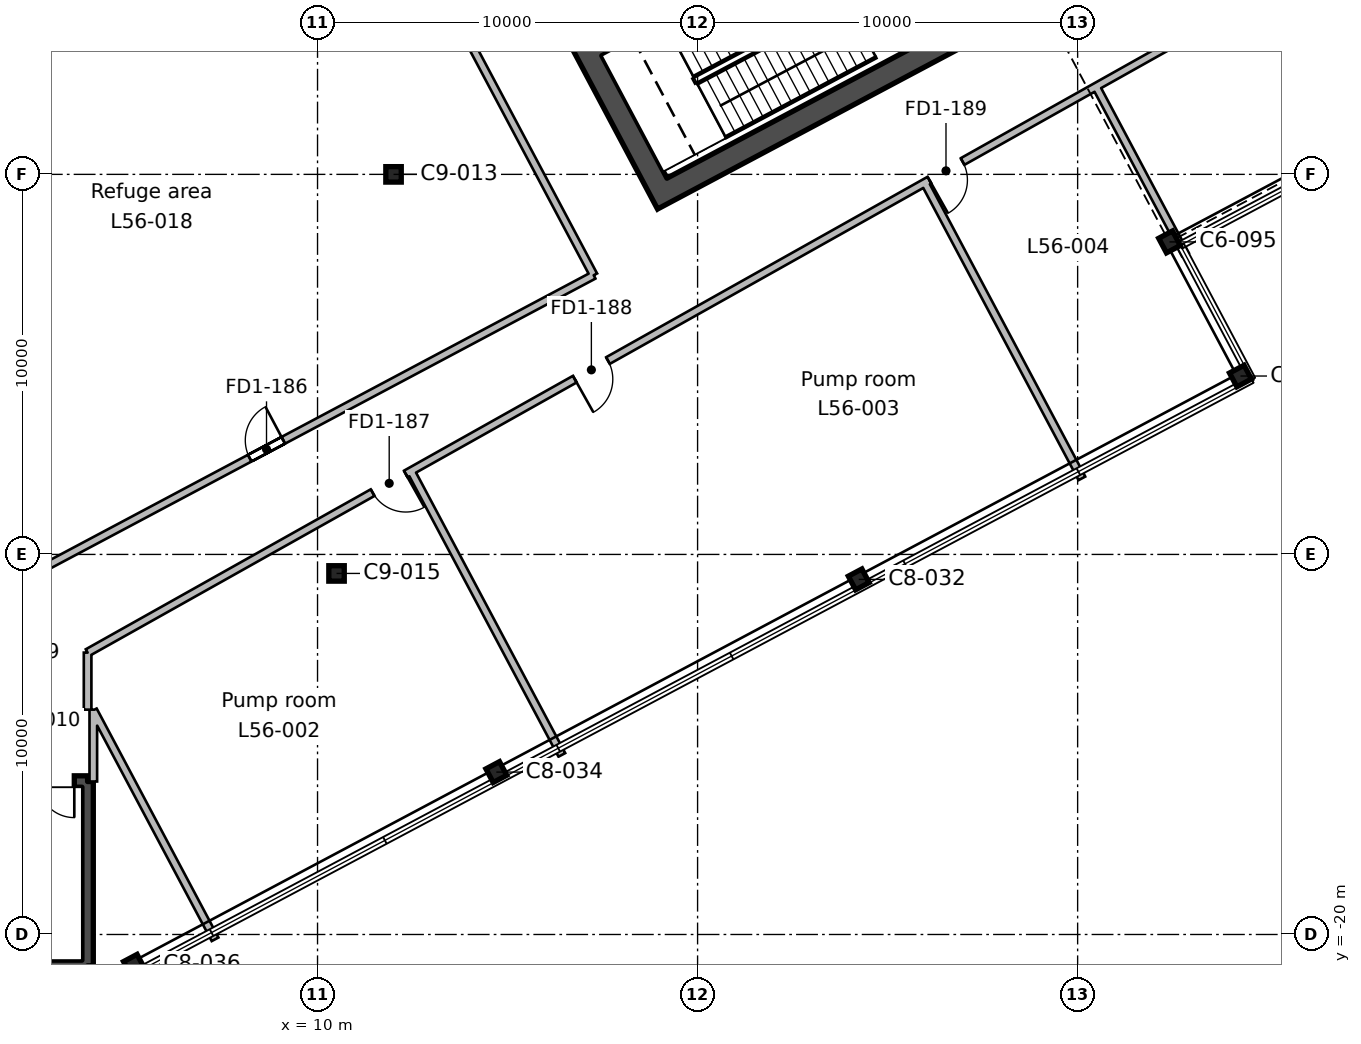
"""IFC4 building model, lengths in metres.
Left out: names, types, materials, properties, quantities, classifications, styles, units other than length and angle.
Written with IfcOpenShell. Run it as: python <this file> out.ifc"""

import sys

from ifc_helpers import new_model, si_unit, direction, frame, frame_2d, origin, origin_2d, place, context, subcontext, project, spatial, rectangle, hollow_rectangle, i_section, extrude, element, fill, save


model = new_model("IFC4")
c1 = context("Model", 3, precision=1e-05, world=origin(), true_north=direction((0.0, 1.0)))
c2 = subcontext(c1, "Body", "Model", "MODEL_VIEW")
j1 = project(units=[si_unit("LENGTHUNIT", "METRE"), si_unit("PLANEANGLEUNIT", "RADIAN")], contexts=[c1])
p1 = place(None, origin())
s1 = spatial("IfcSite", under=j1, at=p1, CompositionType="ELEMENT")
p2 = place(p1, origin())
s2 = spatial("IfcBuilding", under=s1, at=p2, CompositionType="ELEMENT")
p3 = place(p2, frame((0.0, 0.0, 252.0)))
s3 = spatial("IfcBuildingStorey", under=s2, at=p3, CompositionType="ELEMENT", Elevation=252.0)
for number, where, z_axis, x_axis in (
    (1, (5.169, -20.798, 0.0), (0.0, 0.0, 1.0), (0.883, 0.469, 0.0)),
    (2, (14.705, -15.727, 0.0), (0.0, 0.0, 1.0), (0.883, 0.469, 0.0)),
    (3, (24.241, -10.657, 0.0), (0.0, 0.0, 1.0), (0.883, 0.469, 0.0)),
):
    element("IfcColumn", number, at=place(p3, frame(where, z_axis=z_axis, x_axis=x_axis)), inside=s3, PredefinedType="COLUMN", context=c2, shape_type="SweptSolid", body=[
        extrude(i_section(OverallWidth=0.404, OverallDepth=0.406, WebThickness=0.027, FlangeThickness=0.044, FilletRadius=0.015, at=origin_2d()), origin(), (0.0, 0.0, 1.0), 6.0),
    ])
p4 = place(p3, frame((10.5, -10.5, 0.0), z_axis=(0.0, 0.0, 1.0), x_axis=(1.0, 0.0, 0.0)))
e4 = element("IfcColumn", 4, at=p4, inside=s3, PredefinedType="COLUMN", context=c2, shape_type="SweptSolid", body=[
    extrude(hollow_rectangle(XDim=0.406, YDim=0.406, WallThickness=0.015, InnerFilletRadius=0.007, OuterFilletRadius=0.022, at=origin_2d()), origin(), (0.0, 0.0, 1.0), 6.0),
])
for number, where, z_axis, x_axis in (
    (5, (34.285, -5.306, 0.0), (0.0, 0.0, 1.0), (-0.469, 0.883, 0.0)),
    (6, (32.417, -1.777, 0.0), (0.0, 0.0, 1.0), (0.883, 0.469, 0.0)),
):
    element("IfcColumn", number, at=place(p3, frame(where, z_axis=z_axis, x_axis=x_axis)), inside=s3, PredefinedType="COLUMN", context=c2, shape_type="SweptSolid", body=[
        extrude(i_section(OverallWidth=0.412, OverallDepth=0.434, WebThickness=0.036, FlangeThickness=0.057, FilletRadius=0.015, at=origin_2d()), origin(), (0.0, 0.0, 1.0), 6.0),
    ])
p5 = place(p3, frame((12.0, 0.0, 0.0), z_axis=(0.0, 0.0, 1.0), x_axis=(1.0, 0.0, 0.0)))
e7 = element("IfcColumn", 7, at=p5, inside=s3, PredefinedType="COLUMN", context=c2, shape_type="SweptSolid", body=[
    extrude(hollow_rectangle(XDim=0.406, YDim=0.406, WallThickness=0.015, InnerFilletRadius=0.007, OuterFilletRadius=0.022, at=origin_2d()), origin(), (0.0, 0.0, 1.0), 6.0),
])
p6 = place(p3, frame((19.211, -0.771, 0.0), z_axis=(0.0, 0.0, 1.0), x_axis=(-0.469463742137, 0.882951751127, 0.0)))
e8 = element("IfcWall", 8, at=p6, inside=s3, PredefinedType="SHEAR", context=c2, shape_type="SweptSolid", body=[
    extrude(rectangle(XDim=19.4, YDim=0.6, at=frame_2d((9.7, 0.0))), origin(), (0.0, 0.0, 1.0), 6.0),
])
p7 = place(p6, frame((6.7, 0.0, 0.0)))
e9 = element("IfcOpeningElement", 9, at=p7, cuts=e8, PredefinedType="OPENING", context=c2, shape_type="SweptSolid", body=[
    extrude(rectangle(XDim=2.4, YDim=2.4, at=frame_2d((1.2, 1.2))), frame((0.0, 0.31, 0.0), z_axis=(0.0, -1.0, 0.0), x_axis=(1.0, 0.0, 0.0)), (0.0, 0.0, 1.0), 0.62),
])
p8 = place(p3, frame((19.335, -0.366, 0.0), z_axis=(0.0, 0.0, 1.0), x_axis=(0.88294509198, 0.469476266226, 0.0)))
e10 = element("IfcWall", 10, at=p8, inside=s3, PredefinedType="SHEAR", context=c2, shape_type="SweptSolid", body=[
    extrude(rectangle(XDim=20.2, YDim=0.6, at=frame_2d((10.1, 0.0))), origin(), (0.0, 0.0, 1.0), 6.0),
])
p9 = place(p3, frame((17.434, 3.21, 0.0), z_axis=(0.0, 0.0, 1.0), x_axis=(0.882940221191, 0.469485426614, 0.0)))
e11 = element("IfcWall", 11, at=p9, inside=s3, PredefinedType="SHEAR", context=c2, shape_type="SweptSolid", body=[
    extrude(rectangle(XDim=8.0, YDim=0.2, at=frame_2d((4.0, 0.0))), origin(), (0.0, 0.0, 1.0), 6.0),
])
p10 = place(p3, frame((3.95, -15.975, 0.0), z_axis=(0.0, 0.0, 1.0), x_axis=(0.0, -1.0, 0.0)))
e12 = element("IfcWall", 12, at=p10, inside=s3, PredefinedType="SHEAR", context=c2, shape_type="SweptSolid", body=[
    extrude(rectangle(XDim=4.85, YDim=0.3, at=frame_2d((2.425, 0.0))), origin(), (0.0, 0.0, 1.0), 6.0),
])
p11 = place(p3, frame((3.95, -20.825, 0.0), z_axis=(0.0, 0.0, 1.0), x_axis=(-1.0, 0.0, 0.0)))
e13 = element("IfcWall", 13, at=p11, inside=s3, PredefinedType="SHEAR", context=c2, shape_type="SweptSolid", body=[
    extrude(rectangle(XDim=8.3, YDim=0.3, at=frame_2d((4.15, 0.0))), origin(), (0.0, 0.0, 1.0), 6.0),
])
p12 = place(p3, frame((-4.35, -15.975, 0.0), z_axis=(0.0, 0.0, 1.0), x_axis=(1.0, 0.0, 0.0)))
e14 = element("IfcWall", 14, at=p12, inside=s3, PredefinedType="SHEAR", context=c2, shape_type="SweptSolid", body=[
    extrude(rectangle(XDim=8.3, YDim=0.3, at=frame_2d((4.15, 0.0))), origin(), (0.0, 0.0, 1.0), 6.0),
])
p13 = place(p12, frame((6.05, 0.0, 0.0)))
e15 = element("IfcOpeningElement", 15, at=p13, cuts=e14, PredefinedType="OPENING", context=c2, shape_type="SweptSolid", body=[
    extrude(rectangle(XDim=1.9, YDim=2.1, at=frame_2d((0.95, 1.05))), frame((0.0, 0.16, 0.0), z_axis=(0.0, -1.0, 0.0), x_axis=(1.0, 0.0, 0.0)), (0.0, 0.0, 1.0), 0.32),
])
p14 = place(p3, frame((7.501, 15.713, 0.0), z_axis=(0.0, 0.0, 1.0), x_axis=(-0.46948341094, -0.882941292982, 0.0)))
e16 = element("IfcWall", 16, at=p14, inside=s3, PredefinedType="PARTITIONING", context=c2, shape_type="SweptSolid", body=[
    extrude(rectangle(XDim=27.845, YDim=0.2, at=frame_2d((13.923, 0.0))), origin(), (0.0, 0.0, 1.0), 5.55),
])
p15 = place(p3, frame((7.501, 15.713, 0.0), z_axis=(0.0, 0.0, 1.0), x_axis=(0.469480417329, -0.882942884758, 0.0)))
e17 = element("IfcWall", 17, at=p15, inside=s3, PredefinedType="PARTITIONING", context=c2, shape_type="SweptSolid", body=[
    extrude(rectangle(XDim=20.802, YDim=0.2, at=frame_2d((10.401, 0.0))), origin(), (0.0, 0.0, 1.0), 5.55),
])
p16 = place(p3, frame((17.267, -2.654, 0.0), z_axis=(0.0, 0.0, 1.0), x_axis=(-0.882938966386, -0.469487786463, 0.0)))
e18 = element("IfcWall", 18, at=p16, inside=s3, PredefinedType="PARTITIONING", context=c2, shape_type="SweptSolid", body=[
    extrude(rectangle(XDim=19.536, YDim=0.2, at=frame_2d((9.768, 0.0))), origin(), (0.0, 0.0, 1.0), 5.55),
])
p17 = place(p16, frame((9.251, 0.0, 0.0)))
e19 = element("IfcOpeningElement", 19, at=p17, cuts=e18, PredefinedType="OPENING", context=c2, shape_type="SweptSolid", body=[
    extrude(rectangle(XDim=1.0, YDim=2.1, at=frame_2d((0.5, 1.05))), frame((0.0, 0.11, 0.0), z_axis=(0.0, -1.0, 0.0), x_axis=(1.0, 0.0, 0.0)), (0.0, 0.0, 1.0), 0.22),
])
p18 = place(p3, frame((12.458, -7.808, 0.0), z_axis=(0.0, 0.0, 1.0), x_axis=(0.469543551012, -0.882909312275, 0.0)))
e20 = element("IfcWall", 20, at=p18, inside=s3, PredefinedType="PARTITIONING", context=c2, shape_type="SweptSolid", body=[
    extrude(rectangle(XDim=8.457, YDim=0.2, at=frame_2d((4.229, 0.0))), origin(), (0.0, 0.0, 1.0), 5.55),
])
p19 = place(p3, frame((30.504, 2.32, 0.0), z_axis=(0.0, 0.0, 1.0), x_axis=(-0.872045563358, -0.489424698424, 0.0)))
e21 = element("IfcWall", 21, at=p19, inside=s3, PredefinedType="PARTITIONING", context=c2, shape_type="SweptSolid", body=[
    extrude(rectangle(XDim=30.45, YDim=0.2, at=frame_2d((15.225, 0.0))), origin(), (0.0, 0.0, 1.0), 5.55),
])
p20 = place(p19, frame((20.85, 0.0, 0.0)))
e22 = element("IfcOpeningElement", 22, at=p20, cuts=e21, PredefinedType="OPENING", context=c2, shape_type="SweptSolid", body=[
    extrude(rectangle(XDim=1.0, YDim=2.1, at=frame_2d((0.5, 1.05))), frame((0.0, 0.11, 0.0), z_axis=(0.0, -1.0, 0.0), x_axis=(1.0, 0.0, 0.0)), (0.0, 0.0, 1.0), 0.22),
])
p21 = place(p19, frame((14.75, 0.0, 0.0)))
e23 = element("IfcOpeningElement", 23, at=p21, cuts=e21, PredefinedType="OPENING", context=c2, shape_type="SweptSolid", body=[
    extrude(rectangle(XDim=1.0, YDim=2.1, at=frame_2d((0.5, 1.05))), frame((0.0, 0.11, 0.0), z_axis=(0.0, -1.0, 0.0), x_axis=(1.0, 0.0, 0.0)), (0.0, 0.0, 1.0), 0.22),
])
p22 = place(p19, frame((4.05, 0.0, 0.0)))
e24 = element("IfcOpeningElement", 24, at=p22, cuts=e21, PredefinedType="OPENING", context=c2, shape_type="SweptSolid", body=[
    extrude(rectangle(XDim=1.0, YDim=2.1, at=frame_2d((0.5, 1.05))), frame((0.0, 0.11, 0.0), z_axis=(0.0, -1.0, 0.0), x_axis=(1.0, 0.0, 0.0)), (0.0, 0.0, 1.0), 0.22),
])
p23 = place(p3, frame((3.95, -12.583, 0.0), z_axis=(0.0, 0.0, 1.0), x_axis=(0.0, -1.0, 0.0)))
e25 = element("IfcWall", 25, at=p23, inside=s3, PredefinedType="PARTITIONING", context=c2, shape_type="SweptSolid", body=[
    extrude(rectangle(XDim=1.501, YDim=0.2, at=frame_2d((0.75, 0.0))), origin(), (0.0, 0.0, 1.0), 5.55),
])
p24 = place(p3, frame((4.1, -14.084, 0.0), z_axis=(0.0, 0.0, 1.0), x_axis=(0.0, -1.0, 0.0)))
e26 = element("IfcWall", 26, at=p24, inside=s3, PredefinedType="PARTITIONING", context=c2, shape_type="SweptSolid", body=[
    extrude(rectangle(XDim=1.891, YDim=0.2, at=frame_2d((0.946, 0.0))), origin(), (0.0, 0.0, 1.0), 5.55),
])
p25 = place(p3, frame((7.304, -20.127, 0.0), z_axis=(0.0, 0.0, 1.0), x_axis=(-0.469394067071, 0.882988793699, 0.0)))
e27 = element("IfcWall", 27, at=p25, inside=s3, PredefinedType="PARTITIONING", context=c2, shape_type="SweptSolid", body=[
    extrude(rectangle(XDim=6.825, YDim=0.2, at=frame_2d((3.413, 0.0))), origin(), (0.0, 0.0, 1.0), 5.55),
])
p26 = place(p3, frame((25.978, -0.22, 0.0), z_axis=(0.0, 0.0, 1.0), x_axis=(0.469366612672, -0.883003387824, 0.0)))
e28 = element("IfcWall", 28, at=p26, inside=s3, PredefinedType="PARTITIONING", context=c2, shape_type="SweptSolid", body=[
    extrude(rectangle(XDim=8.81, YDim=0.2, at=frame_2d((4.405, 0.0))), origin(), (0.0, 0.0, 1.0), 5.55),
])
p27 = place(p3, frame((30.485, 2.309, 0.0), z_axis=(0.0, 0.0, 1.0), x_axis=(0.469401141758, -0.882985032782, 0.0)))
e29 = element("IfcWall", 29, at=p27, inside=s3, PredefinedType="PARTITIONING", context=c2, shape_type="SweptSolid", body=[
    extrude(rectangle(XDim=5.008, YDim=0.2, at=frame_2d((2.504, 0.0))), origin(), (0.0, 0.0, 1.0), 3.73),
])
p28 = place(p3, frame((40.952, 8.183, 0.0), z_axis=(0.0, 0.0, 1.0), x_axis=(-0.872073046487, -0.489375726402, 0.0)))
e30 = element("IfcWall", 30, at=p28, inside=s3, PredefinedType="PARTITIONING", context=c2, shape_type="SweptSolid", body=[
    extrude(rectangle(XDim=11.981, YDim=0.2, at=frame_2d((5.99, 0.0))), origin(), (0.0, 0.0, 1.0), 3.73),
])
p29 = place(p13, frame((1.9, 0.0, 0.0), z_axis=(0.0, 0.0, 1.0), x_axis=(-1.0, 0.0, 0.0)))
e31 = element("IfcDoor", 31, at=p29, inside=s3, OperationType="DOUBLE_DOOR_SINGLE_SWING", PredefinedType="DOOR", context=c2, shape_type="SweptSolid", body=[
    extrude(rectangle(XDim=1.9, YDim=2.1, at=frame_2d((0.95, 1.05))), frame((0.0, 0.025, 0.0), z_axis=(0.0, -1.0, 0.0), x_axis=(1.0, 0.0, 0.0)), (0.0, 0.0, 1.0), 0.05),
])
fill(e15, e31)
p30 = place(p20, origin())
e32 = element("IfcDoor", 32, at=p30, inside=s3, OperationType="SINGLE_SWING_LEFT", PredefinedType="DOOR", context=c2, shape_type="SweptSolid", body=[
    extrude(rectangle(XDim=1.0, YDim=2.1, at=frame_2d((0.5, 1.05))), frame((0.0, 0.025, 0.0), z_axis=(0.0, -1.0, 0.0), x_axis=(1.0, 0.0, 0.0)), (0.0, 0.0, 1.0), 0.05),
])
fill(e22, e32)
p31 = place(p21, origin())
e33 = element("IfcDoor", 33, at=p31, inside=s3, OperationType="SINGLE_SWING_RIGHT", PredefinedType="DOOR", context=c2, shape_type="SweptSolid", body=[
    extrude(rectangle(XDim=1.0, YDim=2.1, at=frame_2d((0.5, 1.05))), frame((0.0, 0.025, 0.0), z_axis=(0.0, -1.0, 0.0), x_axis=(1.0, 0.0, 0.0)), (0.0, 0.0, 1.0), 0.05),
])
fill(e23, e33)
p32 = place(p22, origin())
e34 = element("IfcDoor", 34, at=p32, inside=s3, OperationType="SINGLE_SWING_RIGHT", PredefinedType="DOOR", context=c2, shape_type="SweptSolid", body=[
    extrude(rectangle(XDim=1.0, YDim=2.1, at=frame_2d((0.5, 1.05))), frame((0.0, 0.025, 0.0), z_axis=(0.0, -1.0, 0.0), x_axis=(1.0, 0.0, 0.0)), (0.0, 0.0, 1.0), 0.05),
])
fill(e24, e34)
p33 = place(p17, frame((1.0, 0.0, 0.0), z_axis=(0.0, 0.0, 1.0), x_axis=(-1.0, 0.0, 0.0)))
e35 = element("IfcDoor", 35, at=p33, inside=s3, OperationType="SINGLE_SWING_RIGHT", PredefinedType="DOOR", context=c2, shape_type="SweptSolid", body=[
    extrude(rectangle(XDim=1.0, YDim=2.1, at=frame_2d((0.5, 1.05))), frame((0.0, 0.025, 0.0), z_axis=(0.0, -1.0, 0.0), x_axis=(1.0, 0.0, 0.0)), (0.0, 0.0, 1.0), 0.05),
])
fill(e19, e35)
save(model, sys.argv[1])
